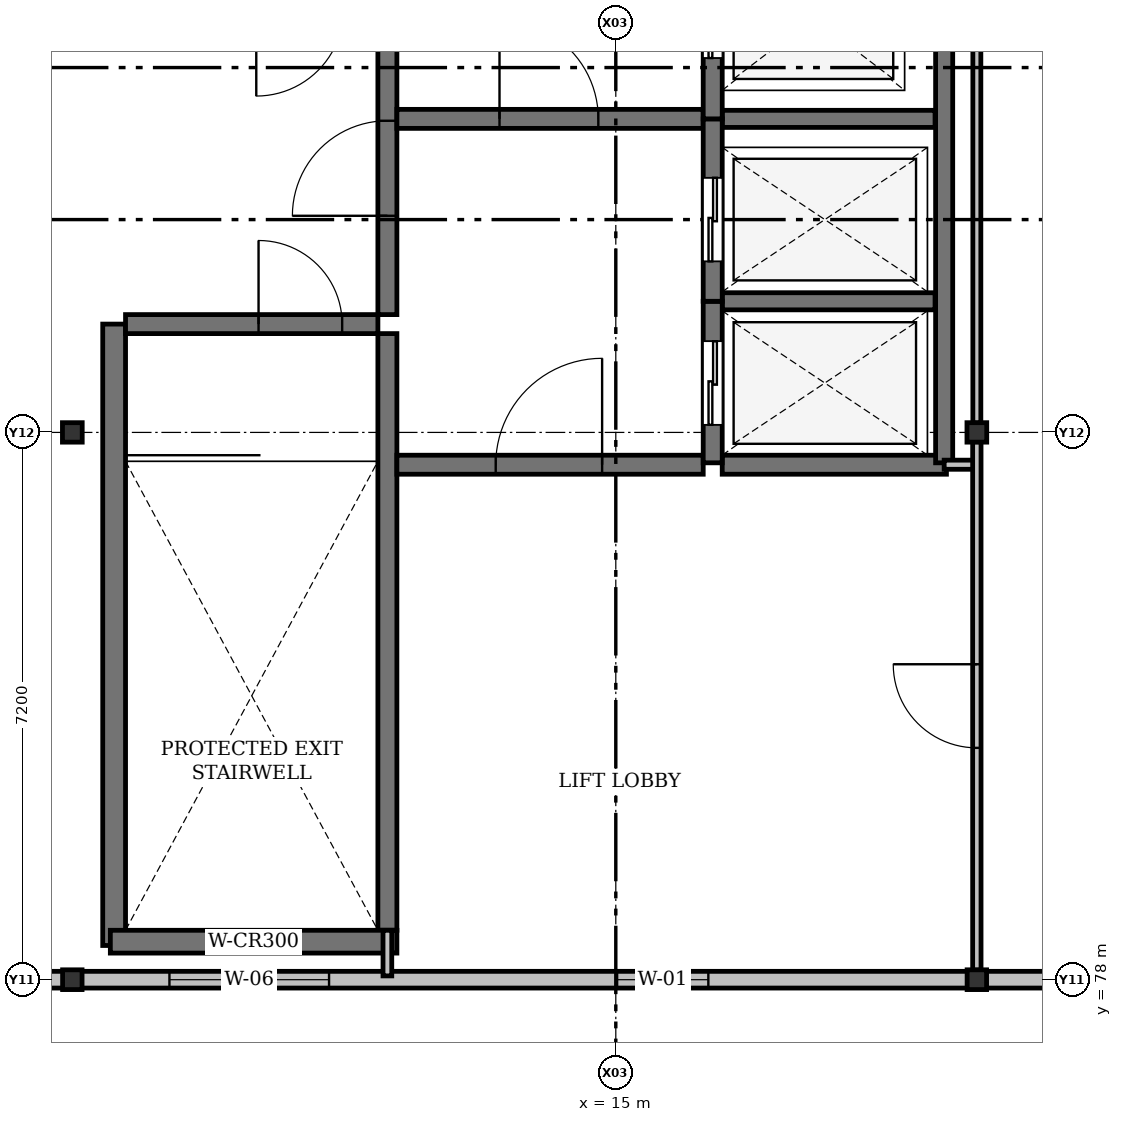
"""IFC4 building model, lengths in metres.
Left out: names, types, materials, properties, quantities, classifications, styles, units other than length and angle.
Written with IfcOpenShell. Run it as: python <this file> out.ifc"""

import sys

from ifc_helpers import new_model, si_unit, direction, frame, frame_2d, origin, origin_2d, place, context, subcontext, project, spatial, rectangle, i_section, extrude, element, fill, save


model = new_model("IFC4")
c1 = context("Model", 3, precision=1e-05, world=origin(), true_north=direction((0.0, 1.0)))
c2 = subcontext(c1, "Body", "Model", "MODEL_VIEW")
j1 = project(units=[si_unit("LENGTHUNIT", "METRE"), si_unit("PLANEANGLEUNIT", "RADIAN")], contexts=[c1])
p1 = place(None, origin())
s1 = spatial("IfcSite", under=j1, at=p1, CompositionType="ELEMENT")
p2 = place(p1, origin())
s2 = spatial("IfcBuilding", under=s1, at=p2, CompositionType="ELEMENT")
p3 = place(p2, frame((0.0, 0.0, 64.5)))
s3 = spatial("IfcBuildingStorey", under=s2, at=p3, CompositionType="ELEMENT", Elevation=64.5)
for number, where, z_axis, x_axis in (
    (1, (7.85, 78.0, 0.0), (0.0, 0.0, 1.0), (1.0, 0.0, 0.0)),
    (2, (19.75, 78.0, 0.0), (0.0, 0.0, 1.0), (1.0, 0.0, 0.0)),
    (3, (7.85, 85.2, 0.0), (0.0, 0.0, 1.0), (0.0, 1.0, 0.0)),
    (4, (19.75, 85.2, 0.0), (0.0, 0.0, 1.0), (0.0, 1.0, 0.0)),
):
    element("IfcColumn", number, at=place(p3, frame(where, z_axis=z_axis, x_axis=x_axis)), inside=s3, PredefinedType="COLUMN", context=c2, shape_type="SweptSolid", body=[
        extrude(i_section(OverallWidth=0.256, OverallDepth=0.26, WebThickness=0.011, FlangeThickness=0.017, FilletRadius=0.013, at=origin_2d()), origin(), (0.0, 0.0, 1.0), 4.2),
    ])
p4 = place(p3, frame((7.85, 78.0, 0.0), z_axis=(0.0, 0.0, 1.0), x_axis=(-1.0, 0.0, 0.0)))
e5 = element("IfcWall", 5, at=p4, inside=s3, PredefinedType="SOLIDWALL", context=c2, shape_type="SweptSolid", body=[
    extrude(rectangle(XDim=7.3, YDim=0.22, at=frame_2d((3.65, 0.0))), origin(), (0.0, 0.0, 1.0), 3.562),
])
p5 = place(p4, frame((0.88, 0.0, 0.92)))
e6 = element("IfcOpeningElement", 6, at=p5, cuts=e5, PredefinedType="OPENING", context=c2, shape_type="SweptSolid", body=[
    extrude(rectangle(XDim=1.05, YDim=1.3, at=frame_2d((0.525, 0.65))), frame((0.0, 0.11, 0.0), z_axis=(0.0, -1.0, 0.0), x_axis=(1.0, 0.0, 0.0)), (0.0, 0.0, 1.0), 0.22),
])
p6 = place(p4, frame((3.795, 0.0, 0.92)))
e7 = element("IfcOpeningElement", 7, at=p6, cuts=e5, PredefinedType="OPENING", context=c2, shape_type="SweptSolid", body=[
    extrude(rectangle(XDim=1.5, YDim=1.4, at=frame_2d((0.75, 0.7))), frame((0.0, 0.11, 0.0), z_axis=(0.0, -1.0, 0.0), x_axis=(1.0, 0.0, 0.0)), (0.0, 0.0, 1.0), 0.22),
])
p7 = place(p3, frame((19.75, 78.0, 0.0), z_axis=(0.0, 0.0, 1.0), x_axis=(-1.0, 0.0, 0.0)))
e8 = element("IfcWall", 8, at=p7, inside=s3, PredefinedType="SOLIDWALL", context=c2, shape_type="SweptSolid", body=[
    extrude(rectangle(XDim=11.9, YDim=0.22, at=frame_2d((5.95, 0.0))), origin(), (0.0, 0.0, 1.0), 3.562),
])
p8 = place(p7, frame((3.532, 0.0, 0.92)))
e9 = element("IfcOpeningElement", 9, at=p8, cuts=e8, PredefinedType="OPENING", context=c2, shape_type="SweptSolid", body=[
    extrude(rectangle(XDim=1.2, YDim=1.4, at=frame_2d((0.6, 0.7))), frame((0.0, 0.11, 0.0), z_axis=(0.0, -1.0, 0.0), x_axis=(1.0, 0.0, 0.0)), (0.0, 0.0, 1.0), 0.22),
])
p9 = place(p7, frame((8.522, 0.0, 0.92)))
e10 = element("IfcOpeningElement", 10, at=p9, cuts=e8, PredefinedType="OPENING", context=c2, shape_type="SweptSolid", body=[
    extrude(rectangle(XDim=2.1, YDim=1.4, at=frame_2d((1.05, 0.7))), frame((0.0, 0.11, 0.0), z_axis=(0.0, -1.0, 0.0), x_axis=(1.0, 0.0, 0.0)), (0.0, 0.0, 1.0), 0.22),
])
p10 = place(p3, frame((23.675, 78.0, 0.0), z_axis=(0.0, 0.0, 1.0), x_axis=(-1.0, 0.0, 0.0)))
e11 = element("IfcWall", 11, at=p10, inside=s3, PredefinedType="SOLIDWALL", context=c2, shape_type="SweptSolid", body=[
    extrude(rectangle(XDim=3.925, YDim=0.22, at=frame_2d((1.962, 0.0))), origin(), (0.0, 0.0, 1.0), 3.562),
])
p11 = place(p3, frame((8.4, 78.45, 0.0), z_axis=(0.0, 0.0, 1.0), x_axis=(0.0, 1.0, 0.0)))
e12 = element("IfcWall", 12, at=p11, inside=s3, PredefinedType="SHEAR", context=c2, shape_type="SweptSolid", body=[
    extrude(rectangle(XDim=8.175, YDim=0.3, at=frame_2d((4.087, 0.0))), origin(), (0.0, 0.0, 1.0), 4.2),
])
p12 = place(p3, frame((11.995, 78.65, 0.0), z_axis=(0.0, 0.0, 1.0), x_axis=(0.0, 1.0, 0.0)))
e13 = element("IfcWall", 13, at=p12, inside=s3, PredefinedType="SHEAR", context=c2, shape_type="SweptSolid", body=[
    extrude(rectangle(XDim=7.85, YDim=0.25, at=frame_2d((3.925, 0.0))), origin(), (0.0, 0.0, 1.0), 4.2),
])
p13 = place(p3, frame((11.995, 86.75, 0.0), z_axis=(0.0, 0.0, 1.0), x_axis=(0.0, 1.0, 0.0)))
e14 = element("IfcWall", 14, at=p13, inside=s3, PredefinedType="SHEAR", context=c2, shape_type="SweptSolid", body=[
    extrude(rectangle(XDim=3.9, YDim=0.25, at=frame_2d((1.95, 0.0))), origin(), (0.0, 0.0, 1.0), 4.2),
])
p14 = place(p13, frame((1.3, 0.0, 0.0)))
e15 = element("IfcOpeningElement", 15, at=p14, cuts=e14, PredefinedType="OPENING", context=c2, shape_type="SweptSolid", body=[
    extrude(rectangle(XDim=1.25, YDim=2.2, at=frame_2d((0.625, 1.1))), frame((0.0, 0.125, 0.0), z_axis=(0.0, -1.0, 0.0), x_axis=(1.0, 0.0, 0.0)), (0.0, 0.0, 1.0), 0.25),
])
p15 = place(p3, frame((8.35, 78.5, 0.0), z_axis=(0.0, 0.0, 1.0), x_axis=(1.0, 0.0, 0.0)))
e16 = element("IfcWall", 16, at=p15, inside=s3, PredefinedType="SHEAR", context=c2, shape_type="SweptSolid", body=[
    extrude(rectangle(XDim=3.77, YDim=0.3, at=frame_2d((1.885, 0.0))), origin(), (0.0, 0.0, 1.0), 4.2),
])
p16 = place(p3, frame((8.55, 86.625, 0.0), z_axis=(0.0, 0.0, 1.0), x_axis=(1.0, 0.0, 0.0)))
e17 = element("IfcWall", 17, at=p16, inside=s3, PredefinedType="SHEAR", context=c2, shape_type="SweptSolid", body=[
    extrude(rectangle(XDim=3.32, YDim=0.25, at=frame_2d((1.66, 0.0))), origin(), (0.0, 0.0, 1.0), 4.2),
])
p17 = place(p16, frame((1.75, 0.0, 0.0)))
e18 = element("IfcOpeningElement", 18, at=p17, cuts=e17, PredefinedType="OPENING", context=c2, shape_type="SweptSolid", body=[
    extrude(rectangle(XDim=1.1, YDim=2.15, at=frame_2d((0.55, 1.075))), frame((0.0, 0.125, 0.0), z_axis=(0.0, -1.0, 0.0), x_axis=(1.0, 0.0, 0.0)), (0.0, 0.0, 1.0), 0.25),
])
p18 = place(p3, frame((12.12, 89.325, 0.0), z_axis=(0.0, 0.0, 1.0), x_axis=(1.0, 0.0, 0.0)))
e19 = element("IfcWall", 19, at=p18, inside=s3, PredefinedType="SHEAR", context=c2, shape_type="SweptSolid", body=[
    extrude(rectangle(XDim=4.03, YDim=0.25, at=frame_2d((2.015, 0.0))), origin(), (0.0, 0.0, 1.0), 4.2),
])
p19 = place(p18, frame((1.35, 0.0, 0.0)))
e20 = element("IfcOpeningElement", 20, at=p19, cuts=e19, PredefinedType="OPENING", context=c2, shape_type="SweptSolid", body=[
    extrude(rectangle(XDim=1.3, YDim=2.2, at=frame_2d((0.65, 1.1))), frame((0.0, 0.125, 0.0), z_axis=(0.0, -1.0, 0.0), x_axis=(1.0, 0.0, 0.0)), (0.0, 0.0, 1.0), 0.25),
])
p20 = place(p3, frame((12.12, 84.775, 0.0), z_axis=(0.0, 0.0, 1.0), x_axis=(1.0, 0.0, 0.0)))
e21 = element("IfcWall", 21, at=p20, inside=s3, PredefinedType="SHEAR", context=c2, shape_type="SweptSolid", body=[
    extrude(rectangle(XDim=4.03, YDim=0.25, at=frame_2d((2.015, 0.0))), origin(), (0.0, 0.0, 1.0), 4.2),
])
p21 = place(p20, frame((1.3, 0.0, 0.0)))
e22 = element("IfcOpeningElement", 22, at=p21, cuts=e21, PredefinedType="OPENING", context=c2, shape_type="SweptSolid", body=[
    extrude(rectangle(XDim=1.4, YDim=2.25, at=frame_2d((0.7, 1.125))), frame((0.0, 0.125, 0.0), z_axis=(0.0, -1.0, 0.0), x_axis=(1.0, 0.0, 0.0)), (0.0, 0.0, 1.0), 0.25),
])
p22 = place(p3, frame((16.4, 84.775, 0.0), z_axis=(0.0, 0.0, 1.0), x_axis=(1.0, 0.0, 0.0)))
e23 = element("IfcWall", 23, at=p22, inside=s3, PredefinedType="SHEAR", context=c2, shape_type="SweptSolid", body=[
    extrude(rectangle(XDim=2.95, YDim=0.25, at=frame_2d((1.475, 0.0))), origin(), (0.0, 0.0, 1.0), 4.2),
])
p23 = place(p3, frame((19.32, 84.8, 0.0), z_axis=(0.0, 0.0, 1.0), x_axis=(0.0, 1.0, 0.0)))
e24 = element("IfcWall", 24, at=p23, inside=s3, PredefinedType="SHEAR", context=c2, shape_type="SweptSolid", body=[
    extrude(rectangle(XDim=13.95, YDim=0.225, at=frame_2d((6.975, 0.0))), origin(), (0.0, 0.0, 1.0), 4.2),
])
for number, where, z_axis, x_axis in (
    (25, (16.4, 86.925, 0.0), (0.0, 0.0, 1.0), (1.0, 0.0, 0.0)),
    (26, (16.4, 89.325, 0.0), (0.0, 0.0, 1.0), (1.0, 0.0, 0.0)),
):
    element("IfcWall", number, at=place(p3, frame(where, z_axis=z_axis, x_axis=x_axis)), inside=s3, PredefinedType="SHEAR", context=c2, shape_type="SweptSolid", body=[
        extrude(rectangle(XDim=2.8, YDim=0.225, at=frame_2d((1.4, 0.0))), origin(), (0.0, 0.0, 1.0), 4.2),
    ])
p24 = place(p3, frame((16.275, 84.8, 0.0), z_axis=(0.0, 0.0, 1.0), x_axis=(0.0, 1.0, 0.0)))
e27 = element("IfcWall", 27, at=p24, inside=s3, PredefinedType="SHEAR", context=c2, shape_type="SweptSolid", body=[
    extrude(rectangle(XDim=2.125, YDim=0.25, at=frame_2d((1.062, 0.0))), origin(), (0.0, 0.0, 1.0), 4.2),
])
p25 = place(p24, frame((0.5, 0.0, 0.0)))
e28 = element("IfcOpeningElement", 28, at=p25, cuts=e27, PredefinedType="OPENING", context=c2, shape_type="SweptSolid", body=[
    extrude(rectangle(XDim=1.1, YDim=2.15, at=frame_2d((0.55, 1.075))), frame((0.0, 0.125, 0.0), z_axis=(0.0, -1.0, 0.0), x_axis=(1.0, 0.0, 0.0)), (0.0, 0.0, 1.0), 0.25),
])
p26 = place(p3, frame((16.275, 86.925, 0.0), z_axis=(0.0, 0.0, 1.0), x_axis=(0.0, 1.0, 0.0)))
e29 = element("IfcWall", 29, at=p26, inside=s3, PredefinedType="SHEAR", context=c2, shape_type="SweptSolid", body=[
    extrude(rectangle(XDim=2.4, YDim=0.25, at=frame_2d((1.2, 0.0))), origin(), (0.0, 0.0, 1.0), 4.2),
])
p27 = place(p26, frame((0.525, 0.0, 0.0)))
e30 = element("IfcOpeningElement", 30, at=p27, cuts=e29, PredefinedType="OPENING", context=c2, shape_type="SweptSolid", body=[
    extrude(rectangle(XDim=1.1, YDim=2.15, at=frame_2d((0.55, 1.075))), frame((0.0, 0.125, 0.0), z_axis=(0.0, -1.0, 0.0), x_axis=(1.0, 0.0, 0.0)), (0.0, 0.0, 1.0), 0.25),
])
p28 = place(p3, frame((16.275, 89.325, 0.0), z_axis=(0.0, 0.0, 1.0), x_axis=(0.0, 1.0, 0.0)))
e31 = element("IfcWall", 31, at=p28, inside=s3, PredefinedType="SHEAR", context=c2, shape_type="SweptSolid", body=[
    extrude(rectangle(XDim=2.4, YDim=0.25, at=frame_2d((1.2, 0.0))), origin(), (0.0, 0.0, 1.0), 4.2),
])
p29 = place(p28, frame((0.8, 0.0, 0.0)))
e32 = element("IfcOpeningElement", 32, at=p29, cuts=e31, PredefinedType="OPENING", context=c2, shape_type="SweptSolid", body=[
    extrude(rectangle(XDim=1.05, YDim=2.15, at=frame_2d((0.525, 1.075))), frame((0.0, 0.125, 0.0), z_axis=(0.0, -1.0, 0.0), x_axis=(1.0, 0.0, 0.0)), (0.0, 0.0, 1.0), 0.25),
])
p30 = place(p3, frame((19.32, 84.775, 0.0), z_axis=(0.0, 0.0, 1.0), x_axis=(1.0, 0.0, 0.0)))
e33 = element("IfcWall", 33, at=p30, inside=s3, PredefinedType="PARTITIONING", context=c2, shape_type="SweptSolid", body=[
    extrude(rectangle(XDim=0.43, YDim=0.12, at=frame_2d((0.215, 0.0))), origin(), (0.0, 0.0, 1.0), 3.512),
])
p31 = place(p3, frame((11.995, 78.05, 0.0), z_axis=(0.0, 0.0, 1.0), x_axis=(0.0, 1.0, 0.0)))
e34 = element("IfcWall", 34, at=p31, inside=s3, PredefinedType="PARTITIONING", context=c2, shape_type="SweptSolid", body=[
    extrude(rectangle(XDim=0.6, YDim=0.115, at=frame_2d((0.3, 0.0))), origin(), (0.0, 0.0, 1.0), 3.95),
])
p32 = place(p3, frame((19.75, 78.125, 0.0), z_axis=(0.0, 0.0, 1.0), x_axis=(0.0, 1.0, 0.0)))
e35 = element("IfcWall", 35, at=p32, inside=s3, PredefinedType="PARTITIONING", context=c2, shape_type="SweptSolid", body=[
    extrude(rectangle(XDim=6.952, YDim=0.11, at=frame_2d((3.476, 0.0))), origin(), (0.0, 0.0, 1.0), 3.512),
])
p33 = place(p32, frame((2.925, 0.0, 0.0)))
e36 = element("IfcOpeningElement", 36, at=p33, cuts=e35, PredefinedType="OPENING", context=c2, shape_type="SweptSolid", body=[
    extrude(rectangle(XDim=1.1, YDim=2.2, at=frame_2d((0.55, 1.1))), frame((0.0, 0.055, 0.0), z_axis=(0.0, -1.0, 0.0), x_axis=(1.0, 0.0, 0.0)), (0.0, 0.0, 1.0), 0.11),
])
p34 = place(p3, frame((19.75, 85.323, 0.0), z_axis=(0.0, 0.0, 1.0), x_axis=(0.0, 1.0, 0.0)))
e37 = element("IfcWall", 37, at=p34, inside=s3, PredefinedType="PARTITIONING", context=c2, shape_type="SweptSolid", body=[
    extrude(rectangle(XDim=6.952, YDim=0.105, at=frame_2d((3.476, 0.0))), origin(), (0.0, 0.0, 1.0), 3.512),
])
p35 = place(p8, origin())
e38 = element("IfcWindow", 38, at=p35, inside=s3, PartitioningType="SINGLE_PANEL", PredefinedType="WINDOW", context=c2, shape_type="SweptSolid", body=[
    extrude(rectangle(XDim=1.2, YDim=1.4, at=frame_2d((0.6, 0.7))), frame((0.0, 0.03, 0.0), z_axis=(0.0, -1.0, 0.0), x_axis=(1.0, 0.0, 0.0)), (0.0, 0.0, 1.0), 0.06),
])
fill(e9, e38)
p36 = place(p9, origin())
e39 = element("IfcWindow", 39, at=p36, inside=s3, PartitioningType="DOUBLE_PANEL_VERTICAL", PredefinedType="WINDOW", context=c2, shape_type="SweptSolid", body=[
    extrude(rectangle(XDim=2.1, YDim=1.4, at=frame_2d((1.05, 0.7))), frame((0.0, 0.03, 0.0), z_axis=(0.0, -1.0, 0.0), x_axis=(1.0, 0.0, 0.0)), (0.0, 0.0, 1.0), 0.06),
])
fill(e10, e39)
p37 = place(p14, origin())
e40 = element("IfcDoor", 40, at=p37, inside=s3, OperationType="SINGLE_SWING_LEFT", PredefinedType="DOOR", context=c2, shape_type="SweptSolid", body=[
    extrude(rectangle(XDim=1.25, YDim=2.2, at=frame_2d((0.625, 1.1))), frame((0.0, 0.025, 0.0), z_axis=(0.0, -1.0, 0.0), x_axis=(1.0, 0.0, 0.0)), (0.0, 0.0, 1.0), 0.05),
])
fill(e15, e40)
p38 = place(p17, origin())
e41 = element("IfcDoor", 41, at=p38, inside=s3, OperationType="SINGLE_SWING_LEFT", PredefinedType="DOOR", context=c2, shape_type="SweptSolid", body=[
    extrude(rectangle(XDim=1.1, YDim=2.15, at=frame_2d((0.55, 1.075))), frame((0.0, 0.025, 0.0), z_axis=(0.0, -1.0, 0.0), x_axis=(1.0, 0.0, 0.0)), (0.0, 0.0, 1.0), 0.05),
])
fill(e18, e41)
p39 = place(p19, origin())
e42 = element("IfcDoor", 42, at=p39, inside=s3, OperationType="SINGLE_SWING_LEFT", PredefinedType="DOOR", context=c2, shape_type="SweptSolid", body=[
    extrude(rectangle(XDim=1.3, YDim=2.2, at=frame_2d((0.65, 1.1))), frame((0.0, 0.025, 0.0), z_axis=(0.0, -1.0, 0.0), x_axis=(1.0, 0.0, 0.0)), (0.0, 0.0, 1.0), 0.05),
])
fill(e20, e42)
p40 = place(p21, origin())
e43 = element("IfcDoor", 43, at=p40, inside=s3, OperationType="SINGLE_SWING_RIGHT", PredefinedType="DOOR", context=c2, shape_type="SweptSolid", body=[
    extrude(rectangle(XDim=1.4, YDim=2.25, at=frame_2d((0.7, 1.125))), frame((0.0, 0.025, 0.0), z_axis=(0.0, -1.0, 0.0), x_axis=(1.0, 0.0, 0.0)), (0.0, 0.0, 1.0), 0.05),
])
fill(e22, e43)
p41 = place(p25, origin())
e44 = element("IfcDoor", 44, at=p41, inside=s3, OperationType="SLIDING_TO_LEFT", PredefinedType="DOOR", context=c2, shape_type="SweptSolid", body=[
    extrude(rectangle(XDim=1.1, YDim=2.15, at=frame_2d((0.55, 1.075))), frame((0.0, 0.025, 0.0), z_axis=(0.0, -1.0, 0.0), x_axis=(1.0, 0.0, 0.0)), (0.0, 0.0, 1.0), 0.05),
])
fill(e28, e44)
p42 = place(p27, origin())
e45 = element("IfcDoor", 45, at=p42, inside=s3, OperationType="SLIDING_TO_LEFT", PredefinedType="DOOR", context=c2, shape_type="SweptSolid", body=[
    extrude(rectangle(XDim=1.1, YDim=2.15, at=frame_2d((0.55, 1.075))), frame((0.0, 0.025, 0.0), z_axis=(0.0, -1.0, 0.0), x_axis=(1.0, 0.0, 0.0)), (0.0, 0.0, 1.0), 0.05),
])
fill(e30, e45)
p43 = place(p29, origin())
e46 = element("IfcDoor", 46, at=p43, inside=s3, OperationType="SLIDING_TO_LEFT", PredefinedType="DOOR", context=c2, shape_type="SweptSolid", body=[
    extrude(rectangle(XDim=1.05, YDim=2.15, at=frame_2d((0.525, 1.075))), frame((0.0, 0.025, 0.0), z_axis=(0.0, -1.0, 0.0), x_axis=(1.0, 0.0, 0.0)), (0.0, 0.0, 1.0), 0.05),
])
fill(e32, e46)
p44 = place(p33, origin())
e47 = element("IfcDoor", 47, at=p44, inside=s3, OperationType="SINGLE_SWING_RIGHT", PredefinedType="DOOR", context=c2, shape_type="SweptSolid", body=[
    extrude(rectangle(XDim=1.1, YDim=2.2, at=frame_2d((0.55, 1.1))), frame((0.0, 0.025, 0.0), z_axis=(0.0, -1.0, 0.0), x_axis=(1.0, 0.0, 0.0)), (0.0, 0.0, 1.0), 0.05),
])
fill(e36, e47)
save(model, sys.argv[1])
